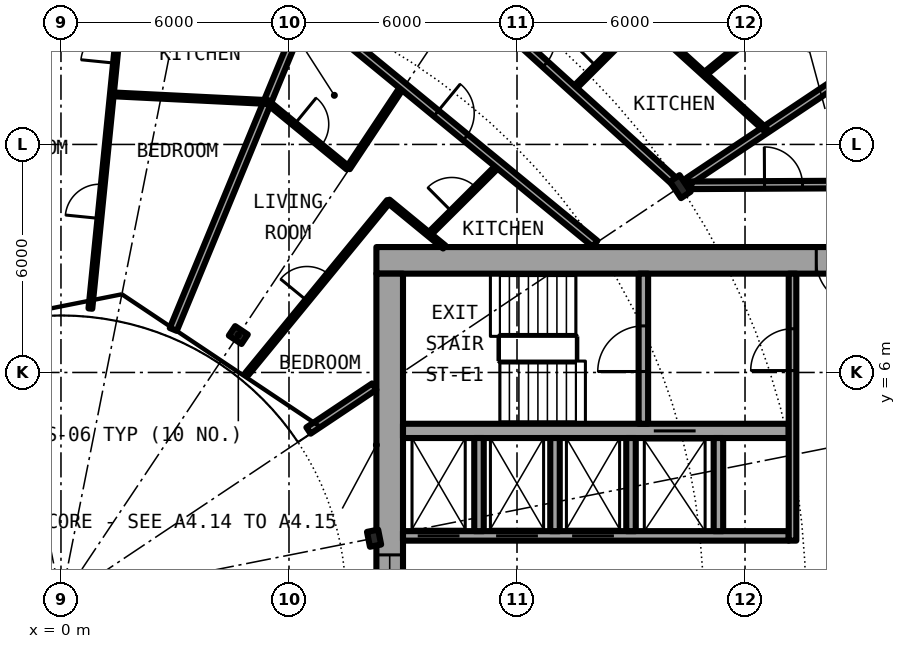
"""IFC4 building model, lengths in metres.
Left out: names, types, materials, properties, quantities, classifications, styles, units other than length and angle.
Written with IfcOpenShell. Run it as: python <this file> out.ifc"""

import sys

from ifc_helpers import new_model, si_unit, direction, frame, frame_2d, origin, origin_2d, place, context, subcontext, project, spatial, rectangle, i_section, extrude, element, fill, save


model = new_model("IFC4")
c1 = context("Model", 3, precision=1e-05, world=origin(), true_north=direction((0.0, 1.0)))
c2 = subcontext(c1, "Body", "Model", "MODEL_VIEW")
j1 = project(units=[si_unit("LENGTHUNIT", "METRE"), si_unit("PLANEANGLEUNIT", "RADIAN")], contexts=[c1])
p1 = place(None, origin())
s1 = spatial("IfcSite", under=j1, at=p1, CompositionType="ELEMENT")
p2 = place(p1, origin())
s2 = spatial("IfcBuilding", under=s1, at=p2, CompositionType="ELEMENT")
p3 = place(p2, frame((0.0, 0.0, 81.9)))
s3 = spatial("IfcBuildingStorey", under=s2, at=p3, CompositionType="ELEMENT", Elevation=81.9)
p4 = place(p3, frame((16.297, 10.889, 0.0), z_axis=(0.0, 0.0, 1.0), x_axis=(0.831469612303, 0.55557023302, 0.0)))
e1 = element("IfcColumn", 1, at=p4, inside=s3, PredefinedType="COLUMN", context=c2, shape_type="SweptSolid", body=[
    extrude(i_section(OverallWidth=0.306, OverallDepth=0.524, WebThickness=0.021, FlangeThickness=0.04, FilletRadius=0.027, at=origin_2d()), origin(), (0.0, 0.0, 1.0), 3.05),
])
for number, where, z_axis, x_axis in (
    (2, (8.239, 1.639, 0.0), (0.0, 0.0, 1.0), (0.981, 0.195, 0.0)),
    (3, (4.667, 6.984, 0.0), (0.0, 0.0, 1.0), (0.556, 0.831, 0.0)),
):
    element("IfcColumn", number, at=place(p3, frame(where, z_axis=z_axis, x_axis=x_axis)), inside=s3, PredefinedType="COLUMN", context=c2, shape_type="SweptSolid", body=[
        extrude(i_section(OverallWidth=0.3, OverallDepth=0.4, WebThickness=0.013, FlangeThickness=0.024, FilletRadius=0.027, at=origin_2d()), origin(), (0.0, 0.0, 1.0), 3.05),
    ])
p5 = place(p3, frame((22.3, 8.95, 0.0), z_axis=(0.0, 0.0, 1.0), x_axis=(-1.0, 0.0, 0.0)))
e4 = element("IfcWall", 4, at=p5, inside=s3, PredefinedType="SHEAR", context=c2, shape_type="SweptSolid", body=[
    extrude(rectangle(XDim=14.0, YDim=0.7, at=frame_2d((7.0, 0.0))), origin(), (0.0, 0.0, 1.0), 3.05),
])
p6 = place(p5, frame((1.225, 0.0, 0.0)))
e5 = element("IfcOpeningElement", 5, at=p6, cuts=e4, PredefinedType="OPENING", context=c2, shape_type="SweptSolid", body=[
    extrude(rectangle(XDim=1.2, YDim=2.3, at=frame_2d((0.6, 1.15))), frame((0.0, 0.36, 0.0), z_axis=(0.0, -1.0, 0.0), x_axis=(1.0, 0.0, 0.0)), (0.0, 0.0, 1.0), 0.72),
])
p7 = place(p3, frame((8.65, -8.6, 0.0), z_axis=(0.0, 0.0, 1.0), x_axis=(0.0, 1.0, 0.0)))
e6 = element("IfcWall", 6, at=p7, inside=s3, PredefinedType="SHEAR", context=c2, shape_type="SweptSolid", body=[
    extrude(rectangle(XDim=17.2, YDim=0.7, at=frame_2d((8.6, 0.0))), origin(), (0.0, 0.0, 1.0), 3.05),
])
p8 = place(p7, frame((7.4, 0.0, 0.1)))
e7 = element("IfcOpeningElement", 7, at=p8, cuts=e6, PredefinedType="OPENING", context=c2, shape_type="SweptSolid", body=[
    extrude(rectangle(XDim=2.4, YDim=2.2, at=frame_2d((1.2, 1.1))), frame((0.0, 0.36, 0.0), z_axis=(0.0, -1.0, 0.0), x_axis=(1.0, 0.0, 0.0)), (0.0, 0.0, 1.0), 0.72),
])
p9 = place(p3, frame((9.0, 1.7, 0.0), z_axis=(0.0, 0.0, 1.0), x_axis=(1.0, 0.0, 0.0)))
e8 = element("IfcWall", 8, at=p9, inside=s3, PredefinedType="SHEAR", context=c2, shape_type="SweptSolid", body=[
    extrude(rectangle(XDim=10.15, YDim=0.25, at=frame_2d((5.075, 0.0))), origin(), (0.0, 0.0, 1.0), 3.05),
])
p10 = place(p9, frame((0.387, 0.0, 0.0)))
e9 = element("IfcOpeningElement", 9, at=p10, cuts=e8, PredefinedType="OPENING", context=c2, shape_type="SweptSolid", body=[
    extrude(rectangle(XDim=1.1, YDim=2.3, at=frame_2d((0.55, 1.15))), frame((0.0, 0.135, 0.0), z_axis=(0.0, -1.0, 0.0), x_axis=(1.0, 0.0, 0.0)), (0.0, 0.0, 1.0), 0.27),
])
p11 = place(p9, frame((2.45, 0.0, 0.0)))
e10 = element("IfcOpeningElement", 10, at=p11, cuts=e8, PredefinedType="OPENING", context=c2, shape_type="SweptSolid", body=[
    extrude(rectangle(XDim=1.1, YDim=2.3, at=frame_2d((0.55, 1.15))), frame((0.0, 0.135, 0.0), z_axis=(0.0, -1.0, 0.0), x_axis=(1.0, 0.0, 0.0)), (0.0, 0.0, 1.0), 0.27),
])
p12 = place(p9, frame((4.45, 0.0, 0.0)))
e11 = element("IfcOpeningElement", 11, at=p12, cuts=e8, PredefinedType="OPENING", context=c2, shape_type="SweptSolid", body=[
    extrude(rectangle(XDim=1.1, YDim=2.3, at=frame_2d((0.55, 1.15))), frame((0.0, 0.135, 0.0), z_axis=(0.0, -1.0, 0.0), x_axis=(1.0, 0.0, 0.0)), (0.0, 0.0, 1.0), 0.27),
])
p13 = place(p3, frame((9.0, 4.462, 0.0), z_axis=(0.0, 0.0, 1.0), x_axis=(1.0, 0.0, 0.0)))
e12 = element("IfcWall", 12, at=p13, inside=s3, PredefinedType="SHEAR", context=c2, shape_type="SweptSolid", body=[
    extrude(rectangle(XDim=10.15, YDim=0.375, at=frame_2d((5.075, 0.0))), origin(), (0.0, 0.0, 1.0), 3.05),
])
p14 = place(p13, frame((6.6, 0.0, 0.0)))
e13 = element("IfcOpeningElement", 13, at=p14, cuts=e12, PredefinedType="OPENING", context=c2, shape_type="SweptSolid", body=[
    extrude(rectangle(XDim=1.1, YDim=2.3, at=frame_2d((0.55, 1.15))), frame((0.0, 0.198, 0.0), z_axis=(0.0, -1.0, 0.0), x_axis=(1.0, 0.0, 0.0)), (0.0, 0.0, 1.0), 0.395),
])
p15 = place(p3, frame((15.325, 4.65, 0.0), z_axis=(0.0, 0.0, 1.0), x_axis=(0.0, 1.0, 0.0)))
e14 = element("IfcWall", 14, at=p15, inside=s3, PredefinedType="SHEAR", context=c2, shape_type="SweptSolid", body=[
    extrude(rectangle(XDim=3.95, YDim=0.25, at=frame_2d((1.975, 0.0))), origin(), (0.0, 0.0, 1.0), 3.05),
])
p16 = place(p15, frame((1.375, 0.0, 0.0)))
e15 = element("IfcOpeningElement", 15, at=p16, cuts=e14, PredefinedType="OPENING", context=c2, shape_type="SweptSolid", body=[
    extrude(rectangle(XDim=1.2, YDim=2.3, at=frame_2d((0.6, 1.15))), frame((0.0, 0.135, 0.0), z_axis=(0.0, -1.0, 0.0), x_axis=(1.0, 0.0, 0.0)), (0.0, 0.0, 1.0), 0.27),
])
for number, where, z_axis, x_axis in (
    (16, (15.0, 1.825, 0.0), (0.0, 0.0, 1.0), (0.0, 1.0, 0.0)),
    (17, (17.3, 1.825, 0.0), (0.0, 0.0, 1.0), (0.0, 1.0, 0.0)),
):
    element("IfcWall", number, at=place(p3, frame(where, z_axis=z_axis, x_axis=x_axis)), inside=s3, PredefinedType="SOLIDWALL", context=c2, shape_type="SweptSolid", body=[
        extrude(rectangle(XDim=2.45, YDim=0.25, at=frame_2d((1.225, 0.0))), origin(), (0.0, 0.0, 1.0), 2.7),
    ])
p17 = place(p3, frame((19.25, 1.575, 0.0), z_axis=(0.0, 0.0, 1.0), x_axis=(0.0, 1.0, 0.0)))
e18 = element("IfcWall", 18, at=p17, inside=s3, PredefinedType="SOLIDWALL", context=c2, shape_type="SweptSolid", body=[
    extrude(rectangle(XDim=7.025, YDim=0.2, at=frame_2d((3.513, 0.0))), origin(), (0.0, 0.0, 1.0), 2.7),
])
p18 = place(p17, frame((4.475, 0.0, 0.0)))
e19 = element("IfcOpeningElement", 19, at=p18, cuts=e18, PredefinedType="OPENING", context=c2, shape_type="SweptSolid", body=[
    extrude(rectangle(XDim=1.1, YDim=2.3, at=frame_2d((0.55, 1.15))), frame((0.0, 0.11, 0.0), z_axis=(0.0, -1.0, 0.0), x_axis=(1.0, 0.0, 0.0)), (0.0, 0.0, 1.0), 0.22),
])
for number, where, z_axis, x_axis in (
    (20, (11.0, 1.825, 0.0), (0.0, 0.0, 1.0), (0.0, 1.0, 0.0)),
    (21, (13.0, 1.825, 0.0), (0.0, 0.0, 1.0), (0.0, 1.0, 0.0)),
):
    element("IfcWall", number, at=place(p3, frame(where, z_axis=z_axis, x_axis=x_axis)), inside=s3, PredefinedType="SOLIDWALL", context=c2, shape_type="SweptSolid", body=[
        extrude(rectangle(XDim=2.45, YDim=0.25, at=frame_2d((1.225, 0.0))), origin(), (0.0, 0.0, 1.0), 2.7),
    ])
p19 = place(p3, frame((0.774, 7.681, 0.0), z_axis=(0.0, 0.0, 1.0), x_axis=(0.099730339513, 0.995014502096, 0.0)))
e22 = element("IfcWall", 22, at=p19, inside=s3, PredefinedType="PARTITIONING", context=c2, shape_type="SweptSolid", body=[
    extrude(rectangle(XDim=8.213, YDim=0.1, at=frame_2d((4.106, 0.0))), origin(), (0.0, 0.0, 1.0), 2.7),
])
p20 = place(p19, frame((6.49, 0.0, 0.0)))
e23 = element("IfcOpeningElement", 23, at=p20, cuts=e22, PredefinedType="OPENING", context=c2, shape_type="SweptSolid", body=[
    extrude(rectangle(XDim=0.9, YDim=2.3, at=frame_2d((0.45, 1.15))), frame((0.0, 0.06, 0.0), z_axis=(0.0, -1.0, 0.0), x_axis=(1.0, 0.0, 0.0)), (0.0, 0.0, 1.0), 0.12),
])
p21 = place(p19, frame((2.384, 0.0, 0.0)))
e24 = element("IfcOpeningElement", 24, at=p21, cuts=e22, PredefinedType="OPENING", context=c2, shape_type="SweptSolid", body=[
    extrude(rectangle(XDim=0.9, YDim=2.3, at=frame_2d((0.45, 1.15))), frame((0.0, 0.06, 0.0), z_axis=(0.0, -1.0, 0.0), x_axis=(1.0, 0.0, 0.0)), (0.0, 0.0, 1.0), 0.12),
])
p22 = place(p3, frame((2.955, 7.132, 0.0), z_axis=(0.0, 0.0, 1.0), x_axis=(0.382556139466, 0.923932248683, 0.0)))
e25 = element("IfcWall", 25, at=p22, inside=s3, PredefinedType="PARTITIONING", context=c2, shape_type="SweptSolid", body=[
    extrude(rectangle(XDim=9.18, YDim=0.2, at=frame_2d((4.59, 0.0))), origin(), (0.0, 0.0, 1.0), 2.7),
])
p23 = place(p3, frame((4.898, 5.968, 0.0), z_axis=(0.0, 0.0, 1.0), x_axis=(0.634358693064, 0.773038840249, 0.0)))
e26 = element("IfcWall", 26, at=p23, inside=s3, PredefinedType="PARTITIONING", context=c2, shape_type="SweptSolid", body=[
    extrude(rectangle(XDim=5.868, YDim=0.1, at=frame_2d((2.934, 0.0))), origin(), (0.0, 0.0, 1.0), 2.7),
])
p24 = place(p23, frame((2.484, 0.0, 0.0)))
e27 = element("IfcOpeningElement", 27, at=p24, cuts=e26, PredefinedType="OPENING", context=c2, shape_type="SweptSolid", body=[
    extrude(rectangle(XDim=0.9, YDim=2.3, at=frame_2d((0.45, 1.15))), frame((0.0, 0.06, 0.0), z_axis=(0.0, -1.0, 0.0), x_axis=(1.0, 0.0, 0.0)), (0.0, 0.0, 1.0), 0.12),
])
p25 = place(p3, frame((7.558, 11.376, 0.0), z_axis=(0.0, 0.0, 1.0), x_axis=(0.553615197403, 0.83277260594, 0.0)))
e28 = element("IfcWall", 28, at=p25, inside=s3, PredefinedType="PARTITIONING", context=c2, shape_type="SweptSolid", body=[
    extrude(rectangle(XDim=2.597, YDim=0.1, at=frame_2d((1.299, 0.0))), origin(), (0.0, 0.0, 1.0), 2.7),
])
p26 = place(p3, frame((9.683, 9.632, 0.0), z_axis=(0.0, 0.0, 1.0), x_axis=(0.708796844581, 0.705412668665, 0.0)))
e29 = element("IfcWall", 29, at=p26, inside=s3, PredefinedType="PARTITIONING", context=c2, shape_type="SweptSolid", body=[
    extrude(rectangle(XDim=2.597, YDim=0.1, at=frame_2d((1.299, 0.0))), origin(), (0.0, 0.0, 1.0), 2.7),
])
p27 = place(p26, frame((0.849, 0.0, 0.0)))
e30 = element("IfcOpeningElement", 30, at=p27, cuts=e29, PredefinedType="OPENING", context=c2, shape_type="SweptSolid", body=[
    extrude(rectangle(XDim=0.9, YDim=2.3, at=frame_2d((0.45, 1.15))), frame((0.0, 0.06, 0.0), z_axis=(0.0, -1.0, 0.0), x_axis=(1.0, 0.0, 0.0)), (0.0, 0.0, 1.0), 0.12),
])
p28 = place(p3, frame((13.474, 13.448, 0.0), z_axis=(0.0, 0.0, 1.0), x_axis=(0.707766479207, 0.706446467123, 0.0)))
e31 = element("IfcWall", 31, at=p28, inside=s3, PredefinedType="PARTITIONING", context=c2, shape_type="SweptSolid", body=[
    extrude(rectangle(XDim=8.138, YDim=0.1, at=frame_2d((4.069, 0.0))), origin(), (0.0, 0.0, 1.0), 2.7),
])
p29 = place(p28, frame((0.861, 0.0, 0.0)))
e32 = element("IfcOpeningElement", 32, at=p29, cuts=e31, PredefinedType="OPENING", context=c2, shape_type="SweptSolid", body=[
    extrude(rectangle(XDim=0.9, YDim=2.3, at=frame_2d((0.45, 1.15))), frame((0.0, 0.06, 0.0), z_axis=(0.0, -1.0, 0.0), x_axis=(1.0, 0.0, 0.0)), (0.0, 0.0, 1.0), 0.12),
])
p30 = place(p28, frame((4.931, 0.0, 0.0)))
e33 = element("IfcOpeningElement", 33, at=p30, cuts=e31, PredefinedType="OPENING", context=c2, shape_type="SweptSolid", body=[
    extrude(rectangle(XDim=0.9, YDim=2.3, at=frame_2d((0.45, 1.15))), frame((0.0, 0.06, 0.0), z_axis=(0.0, -1.0, 0.0), x_axis=(1.0, 0.0, 0.0)), (0.0, 0.0, 1.0), 0.12),
])
p31 = place(p3, frame((16.515, 11.034, 0.0), z_axis=(0.0, 0.0, 1.0), x_axis=(0.831382022135, 0.555701298605, 0.0)))
e34 = element("IfcWall", 34, at=p31, inside=s3, PredefinedType="PARTITIONING", context=c2, shape_type="SweptSolid", body=[
    extrude(rectangle(XDim=7.313, YDim=0.2, at=frame_2d((3.657, 0.0))), origin(), (0.0, 0.0, 1.0), 2.7),
])
p32 = place(p3, frame((16.933, 13.848, 0.0), z_axis=(0.0, 0.0, 1.0), x_axis=(0.774219894911, 0.632916704097, 0.0)))
e35 = element("IfcWall", 35, at=p32, inside=s3, PredefinedType="PARTITIONING", context=c2, shape_type="SweptSolid", body=[
    extrude(rectangle(XDim=5.301, YDim=0.1, at=frame_2d((2.65, 0.0))), origin(), (0.0, 0.0, 1.0), 2.7),
])
p33 = place(p32, frame((2.201, 0.0, 0.0)))
e36 = element("IfcOpeningElement", 36, at=p33, cuts=e35, PredefinedType="OPENING", context=c2, shape_type="SweptSolid", body=[
    extrude(rectangle(XDim=0.9, YDim=2.3, at=frame_2d((0.45, 1.15))), frame((0.0, 0.06, 0.0), z_axis=(0.0, -1.0, 0.0), x_axis=(1.0, 0.0, 0.0)), (0.0, 0.0, 1.0), 0.12),
])
p34 = place(p3, frame((6.513, 4.472, 0.0), z_axis=(0.0, 0.0, 1.0), x_axis=(0.831382204863, 0.555701025225, 0.0)))
e37 = element("IfcWall", 37, at=p34, inside=s3, PredefinedType="PARTITIONING", context=c2, shape_type="SweptSolid", body=[
    extrude(rectangle(XDim=2.082, YDim=0.2, at=frame_2d((1.041, 0.0))), origin(), (0.0, 0.0, 1.0), 2.7),
])
p35 = place(p3, frame((16.588, 10.925, 0.0), z_axis=(0.0, 0.0, 1.0), x_axis=(0.999988019025, 0.004895079807, 0.0)))
e38 = element("IfcWall", 38, at=p35, inside=s3, PredefinedType="PARTITIONING", context=c2, shape_type="SweptSolid", body=[
    extrude(rectangle(XDim=5.087, YDim=0.2, at=frame_2d((2.543, 0.0))), origin(), (0.0, 0.0, 1.0), 2.7),
])
p36 = place(p35, frame((1.925, 0.0, 0.0)))
e39 = element("IfcOpeningElement", 39, at=p36, cuts=e38, PredefinedType="OPENING", context=c2, shape_type="SweptSolid", body=[
    extrude(rectangle(XDim=1.0, YDim=2.3, at=frame_2d((0.5, 1.15))), frame((0.0, 0.11, 0.0), z_axis=(0.0, -1.0, 0.0), x_axis=(1.0, 0.0, 0.0)), (0.0, 0.0, 1.0), 0.22),
])
p37 = place(p3, frame((1.344, 13.319, 0.0), z_axis=(0.0, 0.0, 1.0), x_axis=(0.998772010578, -0.049542616872, 0.0)))
e40 = element("IfcWall", 40, at=p37, inside=s3, PredefinedType="PARTITIONING", context=c2, shape_type="SweptSolid", body=[
    extrude(rectangle(XDim=4.1, YDim=0.1, at=frame_2d((2.05, 0.0))), origin(), (0.0, 0.0, 1.0), 2.7),
])
p38 = place(p3, frame((5.427, 13.121, 0.0), z_axis=(0.0, 0.0, 1.0), x_axis=(0.773323547924, -0.634011585246, 0.0)))
e41 = element("IfcWall", 41, at=p38, inside=s3, PredefinedType="PARTITIONING", context=c2, shape_type="SweptSolid", body=[
    extrude(rectangle(XDim=2.748, YDim=0.1, at=frame_2d((1.374, 0.0))), origin(), (0.0, 0.0, 1.0), 2.7),
])
p39 = place(p38, frame((0.93, 0.0, 0.0)))
e42 = element("IfcOpeningElement", 42, at=p39, cuts=e41, PredefinedType="OPENING", context=c2, shape_type="SweptSolid", body=[
    extrude(rectangle(XDim=0.9, YDim=2.3, at=frame_2d((0.45, 1.15))), frame((0.0, 0.06, 0.0), z_axis=(0.0, -1.0, 0.0), x_axis=(1.0, 0.0, 0.0)), (0.0, 0.0, 1.0), 0.12),
])
p40 = place(p3, frame((8.614, 10.509, 0.0), z_axis=(0.0, 0.0, 1.0), x_axis=(0.772957368531, -0.6344579627, 0.0)))
e43 = element("IfcWall", 43, at=p40, inside=s3, PredefinedType="PARTITIONING", context=c2, shape_type="SweptSolid", body=[
    extrude(rectangle(XDim=1.906, YDim=0.1, at=frame_2d((0.953, 0.0))), origin(), (0.0, 0.0, 1.0), 2.7),
])
p41 = place(p3, frame((6.47, 15.613, 0.0), z_axis=(0.0, 0.0, 1.0), x_axis=(0.77292501819, -0.634497372931, 0.0)))
e44 = element("IfcWall", 44, at=p41, inside=s3, PredefinedType="PARTITIONING", context=c2, shape_type="SweptSolid", body=[
    extrude(rectangle(XDim=9.81, YDim=0.2, at=frame_2d((4.905, 0.0))), origin(), (0.0, 0.0, 1.0), 2.7),
])
p42 = place(p41, frame((4.404, 0.0, 0.0)))
e45 = element("IfcOpeningElement", 45, at=p42, cuts=e44, PredefinedType="OPENING", context=c2, shape_type="SweptSolid", body=[
    extrude(rectangle(XDim=1.0, YDim=2.3, at=frame_2d((0.5, 1.15))), frame((0.0, 0.11, 0.0), z_axis=(0.0, -1.0, 0.0), x_axis=(1.0, 0.0, 0.0)), (0.0, 0.0, 1.0), 0.22),
])
p43 = place(p3, frame((9.239, 17.286, 0.0), z_axis=(0.0, 0.0, 1.0), x_axis=(0.740909940942, -0.671604392044, 0.0)))
e46 = element("IfcWall", 46, at=p43, inside=s3, PredefinedType="PARTITIONING", context=c2, shape_type="SweptSolid", body=[
    extrude(rectangle(XDim=9.367, YDim=0.2, at=frame_2d((4.683, 0.0))), origin(), (0.0, 0.0, 1.0), 2.38),
])
p44 = place(p43, frame((3.731, 0.0, 0.0)))
e47 = element("IfcOpeningElement", 47, at=p44, cuts=e46, PredefinedType="OPENING", context=c2, shape_type="SweptSolid", body=[
    extrude(rectangle(XDim=1.0, YDim=2.3, at=frame_2d((0.5, 1.15))), frame((0.0, 0.11, 0.0), z_axis=(0.0, -1.0, 0.0), x_axis=(1.0, 0.0, 0.0)), (0.0, 0.0, 1.0), 0.22),
])
p45 = place(p3, frame((15.332, 15.297, 0.0), z_axis=(0.0, 0.0, 1.0), x_axis=(0.740836325503, -0.671685595212, 0.0)))
e48 = element("IfcWall", 48, at=p45, inside=s3, PredefinedType="PARTITIONING", context=c2, shape_type="SweptSolid", body=[
    extrude(rectangle(XDim=4.335, YDim=0.1, at=frame_2d((2.168, 0.0))), origin(), (0.0, 0.0, 1.0), 2.7),
])
p46 = place(p10, origin())
e49 = element("IfcDoor", 49, at=p46, inside=s3, OperationType="DOUBLE_DOOR_SLIDING", PredefinedType="DOOR", context=c2, shape_type="SweptSolid", body=[
    extrude(rectangle(XDim=1.1, YDim=2.3, at=frame_2d((0.55, 1.15))), frame((0.0, 0.025, 0.0), z_axis=(0.0, -1.0, 0.0), x_axis=(1.0, 0.0, 0.0)), (0.0, 0.0, 1.0), 0.05),
])
fill(e9, e49)
p47 = place(p11, origin())
e50 = element("IfcDoor", 50, at=p47, inside=s3, OperationType="DOUBLE_DOOR_SLIDING", PredefinedType="DOOR", context=c2, shape_type="SweptSolid", body=[
    extrude(rectangle(XDim=1.1, YDim=2.3, at=frame_2d((0.55, 1.15))), frame((0.0, 0.025, 0.0), z_axis=(0.0, -1.0, 0.0), x_axis=(1.0, 0.0, 0.0)), (0.0, 0.0, 1.0), 0.05),
])
fill(e10, e50)
p48 = place(p12, origin())
e51 = element("IfcDoor", 51, at=p48, inside=s3, OperationType="DOUBLE_DOOR_SLIDING", PredefinedType="DOOR", context=c2, shape_type="SweptSolid", body=[
    extrude(rectangle(XDim=1.1, YDim=2.3, at=frame_2d((0.55, 1.15))), frame((0.0, 0.025, 0.0), z_axis=(0.0, -1.0, 0.0), x_axis=(1.0, 0.0, 0.0)), (0.0, 0.0, 1.0), 0.05),
])
fill(e11, e51)
p49 = place(p14, origin())
e52 = element("IfcDoor", 52, at=p49, inside=s3, OperationType="DOUBLE_DOOR_SLIDING", PredefinedType="DOOR", context=c2, shape_type="SweptSolid", body=[
    extrude(rectangle(XDim=1.1, YDim=2.3, at=frame_2d((0.55, 1.15))), frame((0.0, 0.025, 0.0), z_axis=(0.0, -1.0, 0.0), x_axis=(1.0, 0.0, 0.0)), (0.0, 0.0, 1.0), 0.05),
])
fill(e13, e52)
p50 = place(p16, origin())
e53 = element("IfcDoor", 53, at=p50, inside=s3, OperationType="SINGLE_SWING_LEFT", PredefinedType="DOOR", context=c2, shape_type="SweptSolid", body=[
    extrude(rectangle(XDim=1.2, YDim=2.3, at=frame_2d((0.6, 1.15))), frame((0.0, 0.025, 0.0), z_axis=(0.0, -1.0, 0.0), x_axis=(1.0, 0.0, 0.0)), (0.0, 0.0, 1.0), 0.05),
])
fill(e15, e53)
p51 = place(p18, origin())
e54 = element("IfcDoor", 54, at=p51, inside=s3, OperationType="SINGLE_SWING_LEFT", PredefinedType="DOOR", context=c2, shape_type="SweptSolid", body=[
    extrude(rectangle(XDim=1.1, YDim=2.3, at=frame_2d((0.55, 1.15))), frame((0.0, 0.025, 0.0), z_axis=(0.0, -1.0, 0.0), x_axis=(1.0, 0.0, 0.0)), (0.0, 0.0, 1.0), 0.05),
])
fill(e19, e54)
p52 = place(p6, origin())
e55 = element("IfcDoor", 55, at=p52, inside=s3, OperationType="SINGLE_SWING_RIGHT", PredefinedType="DOOR", context=c2, shape_type="SweptSolid", body=[
    extrude(rectangle(XDim=1.2, YDim=2.3, at=frame_2d((0.6, 1.15))), frame((0.0, 0.025, 0.0), z_axis=(0.0, -1.0, 0.0), x_axis=(1.0, 0.0, 0.0)), (0.0, 0.0, 1.0), 0.05),
])
fill(e5, e55)
p53 = place(p8, origin())
e56 = element("IfcWindow", 56, at=p53, inside=s3, PartitioningType="SINGLE_PANEL", PredefinedType="WINDOW", context=c2, shape_type="SweptSolid", body=[
    extrude(rectangle(XDim=2.4, YDim=2.2, at=frame_2d((1.2, 1.1))), frame((0.0, 0.03, 0.0), z_axis=(0.0, -1.0, 0.0), x_axis=(1.0, 0.0, 0.0)), (0.0, 0.0, 1.0), 0.06),
])
fill(e7, e56)
p54 = place(p44, origin())
e57 = element("IfcDoor", 57, at=p54, inside=s3, OperationType="SINGLE_SWING_LEFT", PredefinedType="DOOR", context=c2, shape_type="SweptSolid", body=[
    extrude(rectangle(XDim=1.0, YDim=2.3, at=frame_2d((0.5, 1.15))), frame((0.0, 0.025, 0.0), z_axis=(0.0, -1.0, 0.0), x_axis=(1.0, 0.0, 0.0)), (0.0, 0.0, 1.0), 0.05),
])
fill(e47, e57)
p55 = place(p29, origin())
e58 = element("IfcDoor", 58, at=p55, inside=s3, OperationType="SINGLE_SWING_LEFT", PredefinedType="DOOR", context=c2, shape_type="SweptSolid", body=[
    extrude(rectangle(XDim=0.9, YDim=2.3, at=frame_2d((0.45, 1.15))), frame((0.0, 0.025, 0.0), z_axis=(0.0, -1.0, 0.0), x_axis=(1.0, 0.0, 0.0)), (0.0, 0.0, 1.0), 0.05),
])
fill(e32, e58)
p56 = place(p42, origin())
e59 = element("IfcDoor", 59, at=p56, inside=s3, OperationType="SINGLE_SWING_LEFT", PredefinedType="DOOR", context=c2, shape_type="SweptSolid", body=[
    extrude(rectangle(XDim=1.0, YDim=2.3, at=frame_2d((0.5, 1.15))), frame((0.0, 0.025, 0.0), z_axis=(0.0, -1.0, 0.0), x_axis=(1.0, 0.0, 0.0)), (0.0, 0.0, 1.0), 0.05),
])
fill(e45, e59)
p57 = place(p39, origin())
e60 = element("IfcDoor", 60, at=p57, inside=s3, OperationType="SINGLE_SWING_RIGHT", PredefinedType="DOOR", context=c2, shape_type="SweptSolid", body=[
    extrude(rectangle(XDim=0.9, YDim=2.3, at=frame_2d((0.45, 1.15))), frame((0.0, 0.025, 0.0), z_axis=(0.0, -1.0, 0.0), x_axis=(1.0, 0.0, 0.0)), (0.0, 0.0, 1.0), 0.05),
])
fill(e42, e60)
p58 = place(p27, origin())
e61 = element("IfcDoor", 61, at=p58, inside=s3, OperationType="SINGLE_SWING_LEFT", PredefinedType="DOOR", context=c2, shape_type="SweptSolid", body=[
    extrude(rectangle(XDim=0.9, YDim=2.3, at=frame_2d((0.45, 1.15))), frame((0.0, 0.025, 0.0), z_axis=(0.0, -1.0, 0.0), x_axis=(1.0, 0.0, 0.0)), (0.0, 0.0, 1.0), 0.05),
])
fill(e30, e61)
p59 = place(p24, origin())
e62 = element("IfcDoor", 62, at=p59, inside=s3, OperationType="SINGLE_SWING_RIGHT", PredefinedType="DOOR", context=c2, shape_type="SweptSolid", body=[
    extrude(rectangle(XDim=0.9, YDim=2.3, at=frame_2d((0.45, 1.15))), frame((0.0, 0.025, 0.0), z_axis=(0.0, -1.0, 0.0), x_axis=(1.0, 0.0, 0.0)), (0.0, 0.0, 1.0), 0.05),
])
fill(e27, e62)
p60 = place(p20, origin())
e63 = element("IfcDoor", 63, at=p60, inside=s3, OperationType="SINGLE_SWING_RIGHT", PredefinedType="DOOR", context=c2, shape_type="SweptSolid", body=[
    extrude(rectangle(XDim=0.9, YDim=2.3, at=frame_2d((0.45, 1.15))), frame((0.0, 0.025, 0.0), z_axis=(0.0, -1.0, 0.0), x_axis=(1.0, 0.0, 0.0)), (0.0, 0.0, 1.0), 0.05),
])
fill(e23, e63)
p61 = place(p21, origin())
e64 = element("IfcDoor", 64, at=p61, inside=s3, OperationType="SINGLE_SWING_LEFT", PredefinedType="DOOR", context=c2, shape_type="SweptSolid", body=[
    extrude(rectangle(XDim=0.9, YDim=2.3, at=frame_2d((0.45, 1.15))), frame((0.0, 0.025, 0.0), z_axis=(0.0, -1.0, 0.0), x_axis=(1.0, 0.0, 0.0)), (0.0, 0.0, 1.0), 0.05),
])
fill(e24, e64)
p62 = place(p36, origin())
e65 = element("IfcDoor", 65, at=p62, inside=s3, OperationType="SINGLE_SWING_LEFT", PredefinedType="DOOR", context=c2, shape_type="SweptSolid", body=[
    extrude(rectangle(XDim=1.0, YDim=2.3, at=frame_2d((0.5, 1.15))), frame((0.0, 0.025, 0.0), z_axis=(0.0, -1.0, 0.0), x_axis=(1.0, 0.0, 0.0)), (0.0, 0.0, 1.0), 0.05),
])
fill(e39, e65)
save(model, sys.argv[1])
